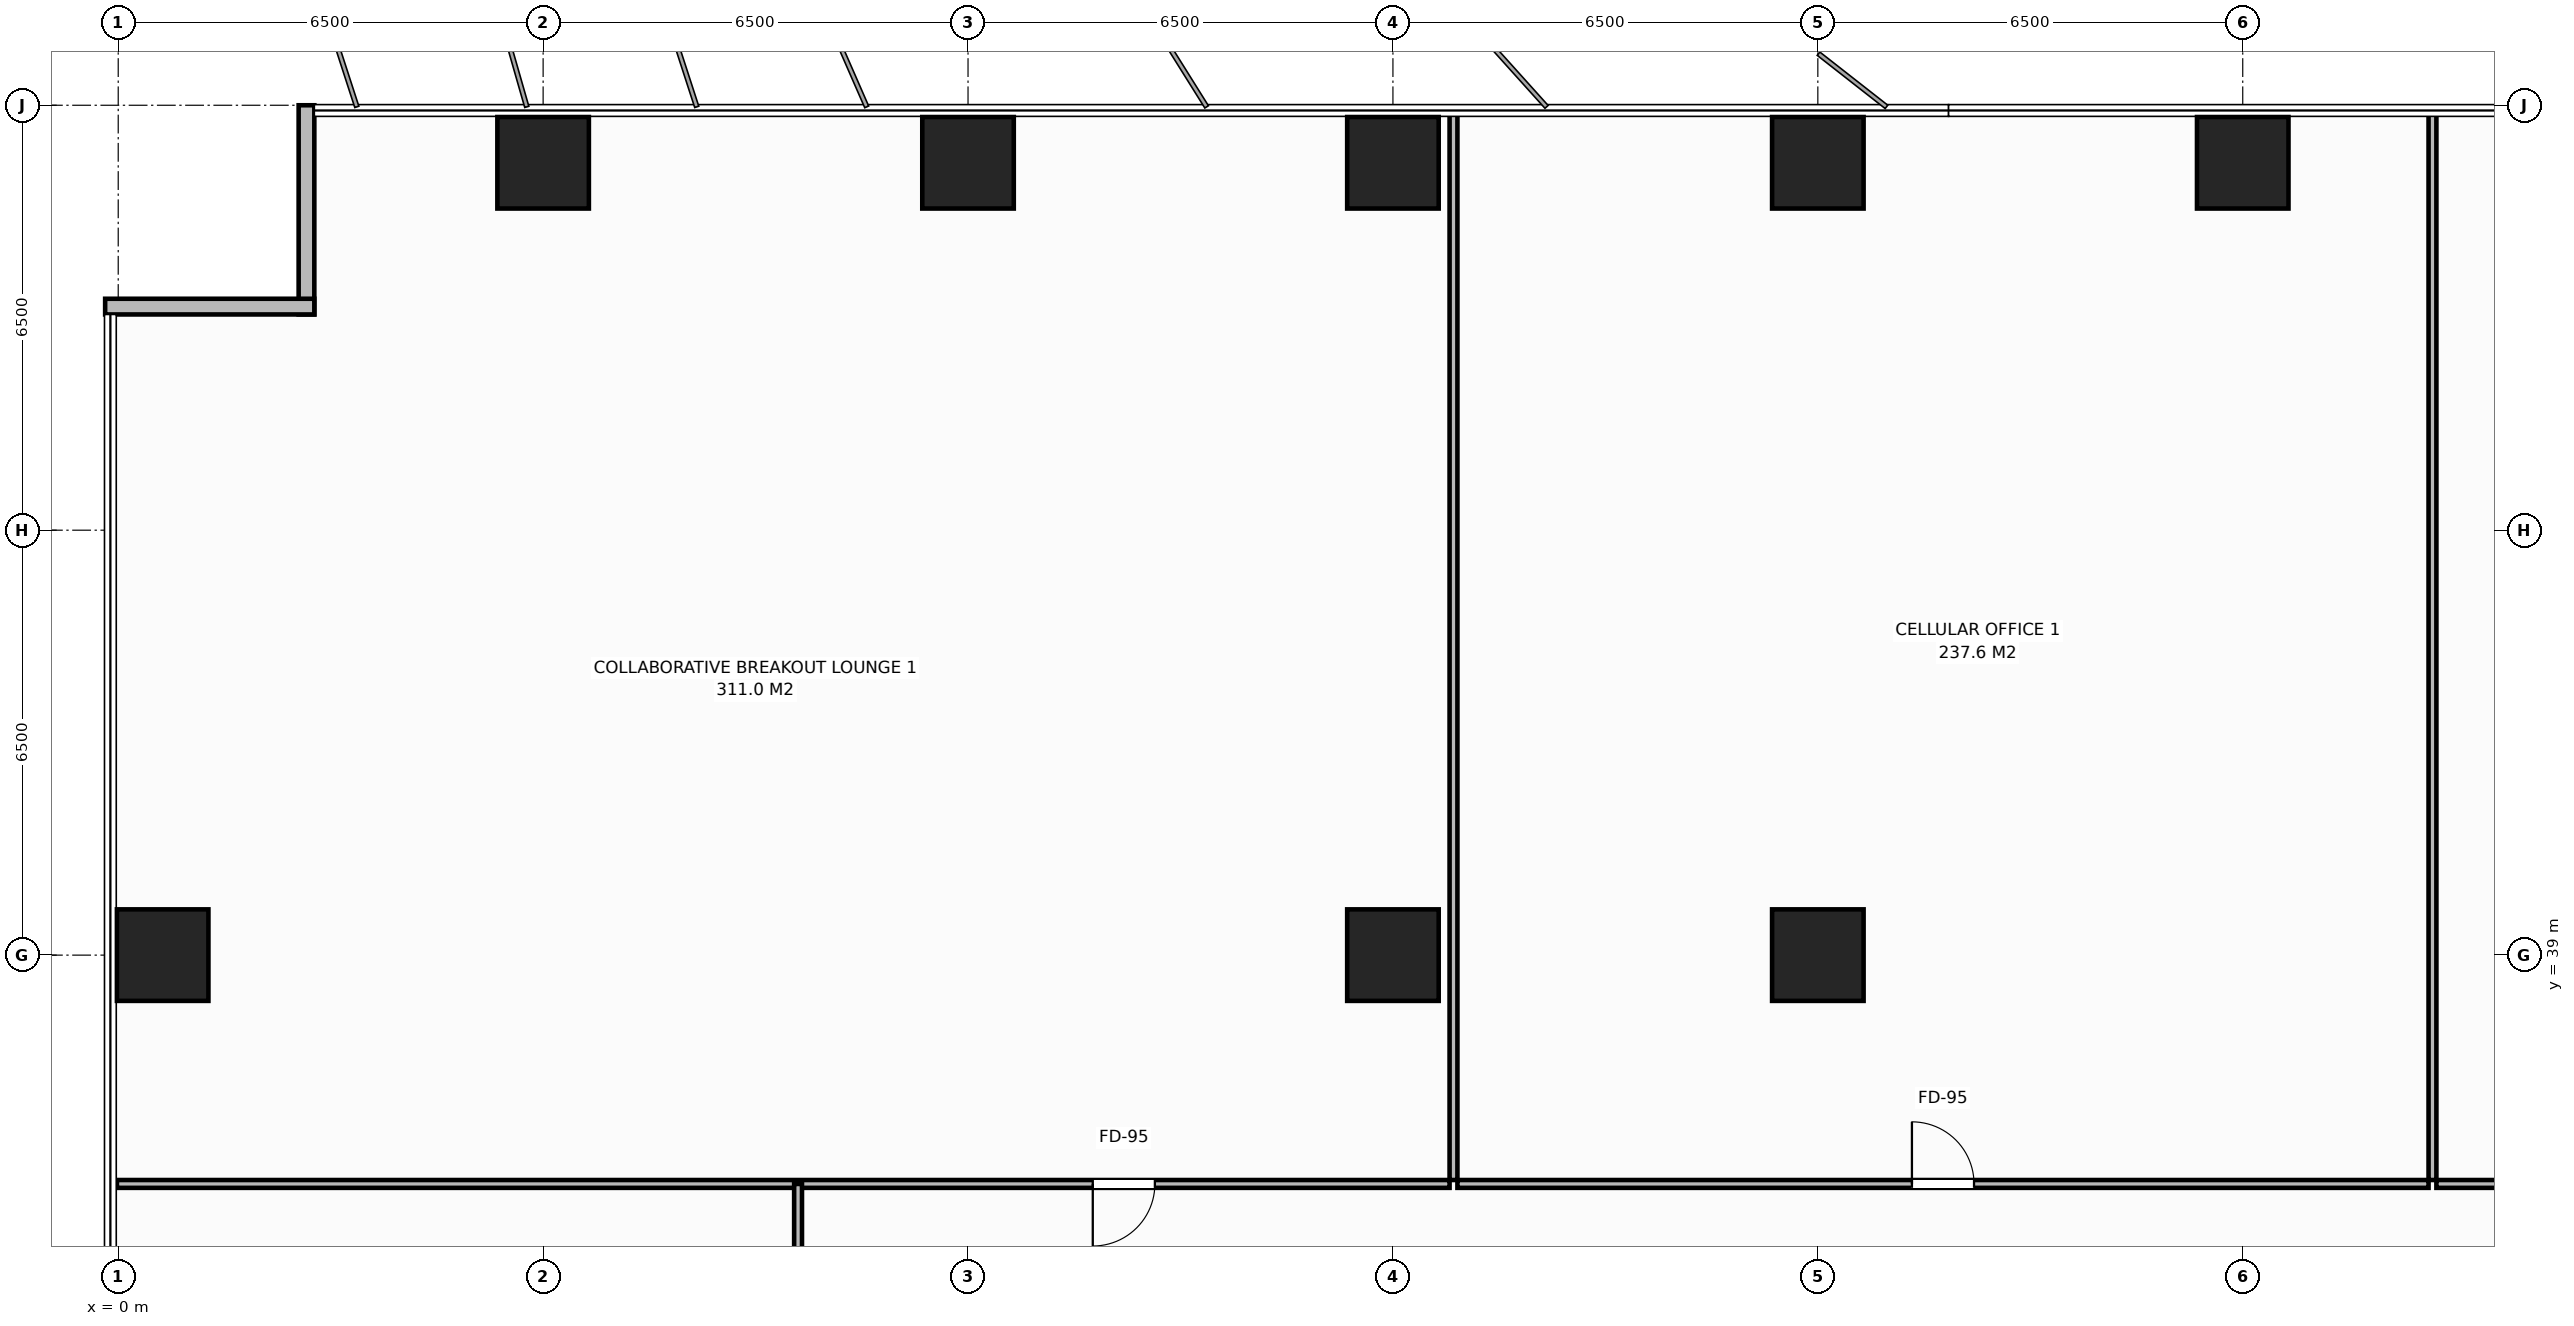
"""IFC4 building model, lengths in metres.
Left out: names, types, materials, properties, quantities, classifications, styles, units other than length and angle.
Written with IfcOpenShell. Run it as: python <this file> out.ifc"""

import sys

from ifc_helpers import new_model, si_unit, direction, frame, frame_2d, origin, origin_2d, place, context, subcontext, project, spatial, rectangle, extrude, element, fill, save


model = new_model("IFC4")
c1 = context("Model", 3, precision=1e-05, world=origin(), true_north=direction((0.0, 1.0)))
c2 = subcontext(c1, "Body", "Model", "MODEL_VIEW")
j1 = project(units=[si_unit("LENGTHUNIT", "METRE"), si_unit("PLANEANGLEUNIT", "RADIAN")], contexts=[c1])
p1 = place(None, origin())
s1 = spatial("IfcSite", under=j1, at=p1, CompositionType="ELEMENT")
p2 = place(p1, origin())
s2 = spatial("IfcBuilding", under=s1, at=p2, CompositionType="ELEMENT")
p3 = place(p2, frame((0.0, 0.0, 43.0)))
s3 = spatial("IfcBuildingStorey", under=s2, at=p3, CompositionType="ELEMENT", Elevation=43.0)
for number, where, z_axis, x_axis in (
    (1, (19.5, 39.0, 0.0), (0.0, 0.0, 1.0), (1.0, 0.0, 0.0)),
    (2, (26.0, 39.0, 0.0), (0.0, 0.0, 1.0), (1.0, 0.0, 0.0)),
    (3, (6.5, 51.12, 0.0), (0.0, 0.0, 1.0), (1.0, 0.0, 0.0)),
    (4, (13.0, 51.12, 0.0), (0.0, 0.0, 1.0), (1.0, 0.0, 0.0)),
    (5, (19.5, 51.12, 0.0), (0.0, 0.0, 1.0), (1.0, 0.0, 0.0)),
    (6, (26.0, 51.12, 0.0), (0.0, 0.0, 1.0), (1.0, 0.0, 0.0)),
    (7, (32.5, 51.12, 0.0), (0.0, 0.0, 1.0), (1.0, 0.0, 0.0)),
    (8, (0.68, 39.0, 0.0), (0.0, 0.0, 1.0), (1.0, 0.0, 0.0)),
):
    element("IfcColumn", number, at=place(p3, frame(where, z_axis=z_axis, x_axis=x_axis)), inside=s3, PredefinedType="COLUMN", context=c2, shape_type="SweptSolid", body=[
        extrude(rectangle(XDim=1.4, YDim=1.4, at=origin_2d()), origin(), (0.0, 0.0, 1.0), 3.8),
    ])
for number, where, z_axis, x_axis in (
    (9, (2.88, 48.8, 0.0), (0.0, 0.0, 1.0), (0.0, 1.0, 0.0)),
    (10, (-0.2, 48.92, 0.0), (0.0, 0.0, 1.0), (1.0, 0.0, 0.0)),
):
    element("IfcWall", number, at=place(p3, frame(where, z_axis=z_axis, x_axis=x_axis)), inside=s3, PredefinedType="STANDARD", context=c2, shape_type="SweptSolid", body=[
        extrude(rectangle(XDim=3.2, YDim=0.24, at=frame_2d((1.6, 0.0))), origin(), (0.0, 0.0, 1.0), 3.55),
    ])
p4 = place(p3, frame((20.427, 35.56, 0.0), z_axis=(0.0, 0.0, 1.0), x_axis=(0.0, 1.0, 0.0)))
e11 = element("IfcWall", 11, at=p4, inside=s3, PredefinedType="PARTITIONING", context=c2, shape_type="SweptSolid", body=[
    extrude(rectangle(XDim=16.42, YDim=0.12, at=frame_2d((8.21, 0.0))), origin(), (0.0, 0.0, 1.0), 3.55),
])
p5 = place(p3, frame((-0.02, 35.5, 0.0), z_axis=(0.0, 0.0, 1.0), x_axis=(1.0, 0.0, 0.0)))
e12 = element("IfcWall", 12, at=p5, inside=s3, PredefinedType="PARTITIONING", context=c2, shape_type="SweptSolid", body=[
    extrude(rectangle(XDim=20.386, YDim=0.12, at=frame_2d((10.193, 0.0))), origin(), (0.0, 0.0, 1.0), 3.55),
])
p6 = place(p5, frame((14.928, 0.0, 0.0)))
e13 = element("IfcOpeningElement", 13, at=p6, cuts=e12, PredefinedType="OPENING", context=c2, shape_type="SweptSolid", body=[
    extrude(rectangle(XDim=0.95, YDim=2.15, at=frame_2d((0.475, 1.075))), frame((0.0, 0.07, 0.0), z_axis=(0.0, -1.0, 0.0), x_axis=(1.0, 0.0, 0.0)), (0.0, 0.0, 1.0), 0.14),
])
p7 = place(p3, frame((35.402, 35.56, 0.0), z_axis=(0.0, 0.0, 1.0), x_axis=(0.0, 1.0, 0.0)))
e14 = element("IfcWall", 14, at=p7, inside=s3, PredefinedType="PARTITIONING", context=c2, shape_type="SweptSolid", body=[
    extrude(rectangle(XDim=16.42, YDim=0.12, at=frame_2d((8.21, 0.0))), origin(), (0.0, 0.0, 1.0), 3.55),
])
p8 = place(p3, frame((20.487, 35.5, 0.0), z_axis=(0.0, 0.0, 1.0), x_axis=(1.0, 0.0, 0.0)))
e15 = element("IfcWall", 15, at=p8, inside=s3, PredefinedType="PARTITIONING", context=c2, shape_type="SweptSolid", body=[
    extrude(rectangle(XDim=14.856, YDim=0.12, at=frame_2d((7.428, 0.0))), origin(), (0.0, 0.0, 1.0), 3.55),
])
p9 = place(p8, frame((6.953, 0.0, 0.0)))
e16 = element("IfcOpeningElement", 16, at=p9, cuts=e15, PredefinedType="OPENING", context=c2, shape_type="SweptSolid", body=[
    extrude(rectangle(XDim=0.95, YDim=2.15, at=frame_2d((0.475, 1.075))), frame((0.0, 0.07, 0.0), z_axis=(0.0, -1.0, 0.0), x_axis=(1.0, 0.0, 0.0)), (0.0, 0.0, 1.0), 0.14),
])
p10 = place(p3, frame((35.462, 35.5, 0.0), z_axis=(0.0, 0.0, 1.0), x_axis=(1.0, 0.0, 0.0)))
e17 = element("IfcWall", 17, at=p10, inside=s3, PredefinedType="PARTITIONING", context=c2, shape_type="SweptSolid", body=[
    extrude(rectangle(XDim=23.058, YDim=0.12, at=frame_2d((11.529, 0.0))), origin(), (0.0, 0.0, 1.0), 3.55),
])
p11 = place(p10, frame((11.054, 0.0, 0.0)))
e18 = element("IfcOpeningElement", 18, at=p11, cuts=e17, PredefinedType="OPENING", context=c2, shape_type="SweptSolid", body=[
    extrude(rectangle(XDim=0.95, YDim=2.15, at=frame_2d((0.475, 1.075))), frame((0.0, 0.07, 0.0), z_axis=(0.0, -1.0, 0.0), x_axis=(1.0, 0.0, 0.0)), (0.0, 0.0, 1.0), 0.14),
])
p12 = place(p3, frame((10.4, 26.0, 0.0), z_axis=(0.0, 0.0, 1.0), x_axis=(0.0, 1.0, 0.0)))
e19 = element("IfcWall", 19, at=p12, inside=s3, PredefinedType="PARTITIONING", context=c2, shape_type="SweptSolid", body=[
    extrude(rectangle(XDim=9.5, YDim=0.12, at=frame_2d((4.75, 0.0))), origin(), (0.0, 0.0, 1.0), 3.55),
])
p13 = place(p12, frame((3.225, 0.0, 0.0)))
e20 = element("IfcOpeningElement", 20, at=p13, cuts=e19, PredefinedType="OPENING", context=c2, shape_type="SweptSolid", body=[
    extrude(rectangle(XDim=0.95, YDim=2.15, at=frame_2d((0.475, 1.075))), frame((0.0, 0.07, 0.0), z_axis=(0.0, -1.0, 0.0), x_axis=(1.0, 0.0, 0.0)), (0.0, 0.0, 1.0), 0.14),
])
p14 = place(p6, origin())
e21 = element("IfcDoor", 21, at=p14, inside=s3, OperationType="SINGLE_SWING_RIGHT", PredefinedType="DOOR", context=c2, shape_type="SweptSolid", body=[
    extrude(rectangle(XDim=0.95, YDim=2.15, at=frame_2d((0.475, 1.075))), frame((0.0, 0.025, 0.0), z_axis=(0.0, -1.0, 0.0), x_axis=(1.0, 0.0, 0.0)), (0.0, 0.0, 1.0), 0.05),
])
fill(e13, e21)
p15 = place(p9, origin())
e22 = element("IfcDoor", 22, at=p15, inside=s3, OperationType="SINGLE_SWING_LEFT", PredefinedType="DOOR", context=c2, shape_type="SweptSolid", body=[
    extrude(rectangle(XDim=0.95, YDim=2.15, at=frame_2d((0.475, 1.075))), frame((0.0, 0.025, 0.0), z_axis=(0.0, -1.0, 0.0), x_axis=(1.0, 0.0, 0.0)), (0.0, 0.0, 1.0), 0.05),
])
fill(e16, e22)
save(model, sys.argv[1])
